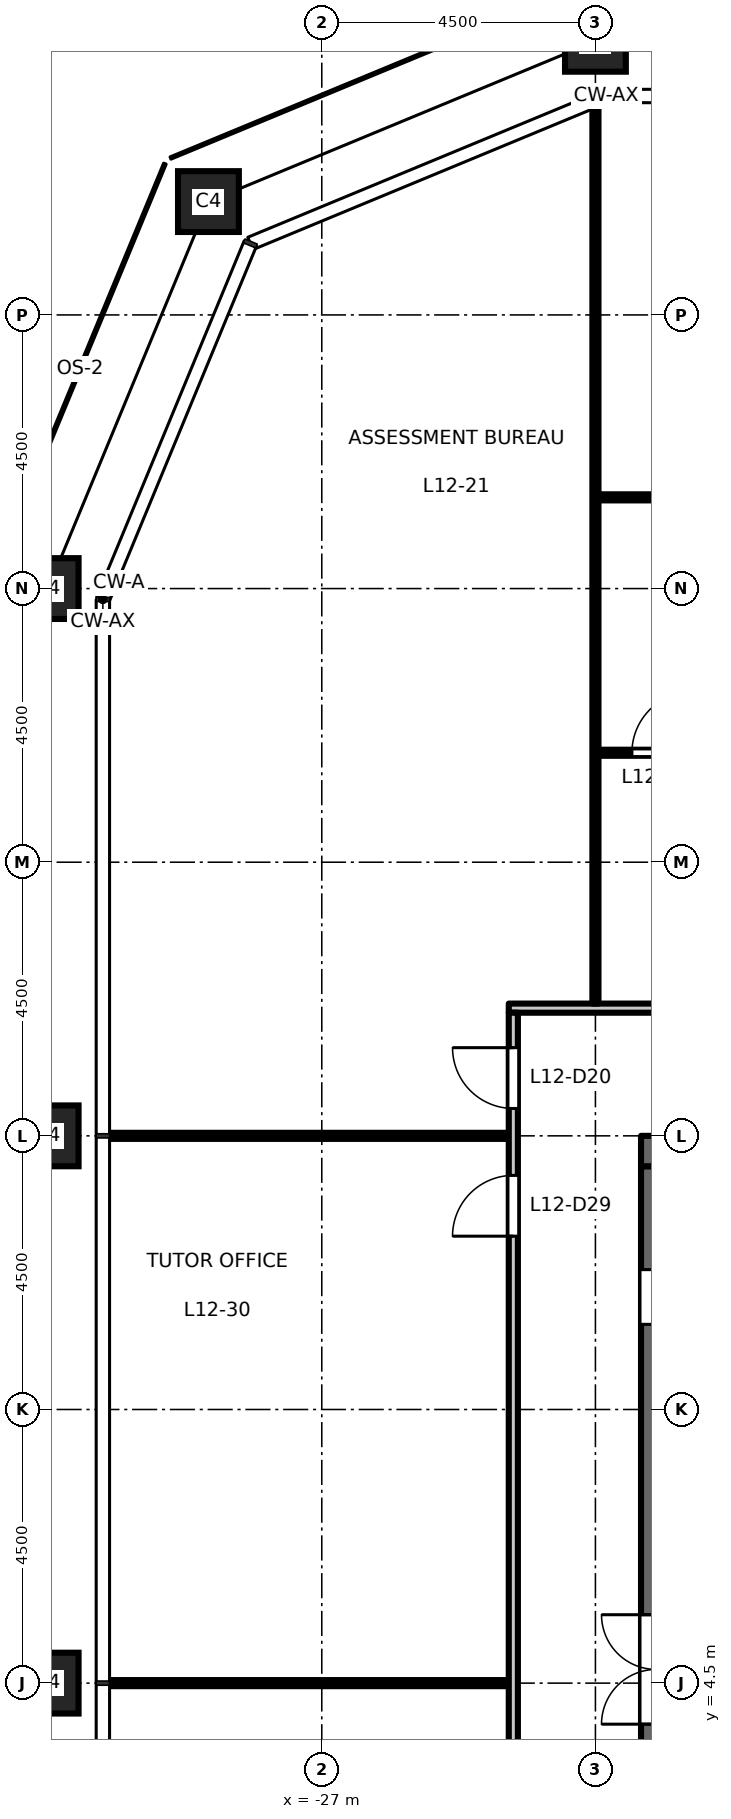
"""IFC4 building model, lengths in metres.
Left out: names, types, materials, properties, quantities, classifications, styles, units other than length and angle.
Written with IfcOpenShell. Run it as: python <this file> out.ifc"""

import sys

from ifc_helpers import new_model, si_unit, direction, frame, frame_2d, origin, origin_2d, place, context, subcontext, project, spatial, rectangle, hollow_rectangle, extrude, element, fill, save


model = new_model("IFC4")
c1 = context("Model", 3, precision=1e-05, world=origin(), true_north=direction((0.0, 1.0)))
c2 = subcontext(c1, "Body", "Model", "MODEL_VIEW")
j1 = project(units=[si_unit("LENGTHUNIT", "METRE"), si_unit("PLANEANGLEUNIT", "RADIAN")], contexts=[c1])
p1 = place(None, origin())
s1 = spatial("IfcSite", under=j1, at=p1, CompositionType="ELEMENT")
p2 = place(p1, origin())
s2 = spatial("IfcBuilding", under=s1, at=p2, CompositionType="ELEMENT")
p3 = place(p2, frame((0.0, 0.0, 58.2)))
s3 = spatial("IfcBuildingStorey", under=s2, at=p3, CompositionType="ELEMENT", Elevation=58.2)
for number, where, z_axis, x_axis in (
    (1, (-22.5, 31.5, 0.0), (0.0, 0.0, 1.0), (1.0, 0.0, 0.0)),
    (2, (-28.864, 28.864, 0.0), (0.0, 0.0, 1.0), (1.0, 0.0, 0.0)),
    (3, (-31.5, 22.5, 0.0), (0.0, 0.0, 1.0), (1.0, 0.0, 0.0)),
    (4, (-31.5, 13.5, 0.0), (0.0, 0.0, 1.0), (1.0, 0.0, 0.0)),
    (5, (-31.5, 4.5, 0.0), (0.0, 0.0, 1.0), (1.0, 0.0, 0.0)),
):
    element("IfcColumn", number, at=place(p3, frame(where, z_axis=z_axis, x_axis=x_axis)), inside=s3, PredefinedType="COLUMN", context=c2, shape_type="SweptSolid", body=[
        extrude(hollow_rectangle(XDim=1.0, YDim=1.0, WallThickness=0.06, at=origin_2d()), origin(), (0.0, 0.0, 1.0), 4.5),
    ])
p4 = place(p3, frame((-21.5, -13.0, 0.0), z_axis=(0.0, 0.0, 1.0), x_axis=(0.0, 1.0, 0.0)))
e6 = element("IfcWall", 6, at=p4, inside=s3, PredefinedType="SHEAR", context=c2, shape_type="SweptSolid", body=[
    extrude(rectangle(XDim=26.0, YDim=0.5, at=frame_2d((13.0, 0.0))), origin(), (0.0, 0.0, 1.0), 4.35),
])
p5 = place(p4, frame((16.825, 0.0, 0.0)))
e7 = element("IfcOpeningElement", 7, at=p5, cuts=e6, PredefinedType="OPENING", context=c2, shape_type="SweptSolid", body=[
    extrude(rectangle(XDim=1.8, YDim=2.1, at=frame_2d((0.9, 1.05))), frame((0.0, 0.26, 0.0), z_axis=(0.0, -1.0, 0.0), x_axis=(1.0, 0.0, 0.0)), (0.0, 0.0, 1.0), 0.52),
])
p6 = place(p4, frame((7.375, 0.0, 0.0)))
e8 = element("IfcOpeningElement", 8, at=p6, cuts=e6, PredefinedType="OPENING", context=c2, shape_type="SweptSolid", body=[
    extrude(rectangle(XDim=1.8, YDim=2.1, at=frame_2d((0.9, 1.05))), frame((0.0, 0.26, 0.0), z_axis=(0.0, -1.0, 0.0), x_axis=(1.0, 0.0, 0.0)), (0.0, 0.0, 1.0), 0.52),
])
p7 = place(p4, frame((23.4, 0.0, 0.0)))
e9 = element("IfcOpeningElement", 9, at=p7, cuts=e6, PredefinedType="OPENING", context=c2, shape_type="SweptSolid", body=[
    extrude(rectangle(XDim=0.9, YDim=2.1, at=frame_2d((0.45, 1.05))), frame((0.0, 0.26, 0.0), z_axis=(0.0, -1.0, 0.0), x_axis=(1.0, 0.0, 0.0)), (0.0, 0.0, 1.0), 0.52),
])
p8 = place(p3, frame((-8.25, 13.25, 0.0), z_axis=(0.0, 0.0, 1.0), x_axis=(-1.0, 0.0, 0.0)))
e10 = element("IfcWall", 10, at=p8, inside=s3, PredefinedType="SHEAR", context=c2, shape_type="SweptSolid", body=[
    extrude(rectangle(XDim=13.5, YDim=0.5, at=frame_2d((6.75, 0.0))), origin(), (0.0, 0.0, 1.0), 4.35),
])
p9 = place(p3, frame((-30.51, 4.5, 0.0), z_axis=(0.0, 0.0, 1.0), x_axis=(1.0, 0.0, 0.0)))
e11 = element("IfcWall", 11, at=p9, inside=s3, PredefinedType="PARTITIONING", context=c2, shape_type="SweptSolid", body=[
    extrude(rectangle(XDim=6.585, YDim=0.1, at=frame_2d((3.292, 0.0))), origin(), (0.0, 0.0, 1.0), 4.35),
])
p10 = place(p3, frame((-30.51, 13.5, 0.0), z_axis=(0.0, 0.0, 1.0), x_axis=(1.0, 0.0, 0.0)))
e12 = element("IfcWall", 12, at=p10, inside=s3, PredefinedType="PARTITIONING", context=c2, shape_type="SweptSolid", body=[
    extrude(rectangle(XDim=6.585, YDim=0.1, at=frame_2d((3.292, 0.0))), origin(), (0.0, 0.0, 1.0), 3.35),
])
p11 = place(p3, frame((-23.925, 15.6, 0.0), z_axis=(0.0, 0.0, 1.0), x_axis=(1.0, 0.0, 0.0)))
e13 = element("IfcWall", 13, at=p11, inside=s3, PredefinedType="PARTITIONING", context=c2, shape_type="SweptSolid", body=[
    extrude(rectangle(XDim=47.85, YDim=0.15, at=frame_2d((23.925, 0.0))), origin(), (0.0, 0.0, 1.0), 4.35),
])
p12 = place(p11, frame((8.775, 0.0, 0.0)))
e14 = element("IfcOpeningElement", 14, at=p12, cuts=e13, PredefinedType="OPENING", context=c2, shape_type="SweptSolid", body=[
    extrude(rectangle(XDim=1.0, YDim=2.1, at=frame_2d((0.5, 1.05))), frame((0.0, 0.085, 0.0), z_axis=(0.0, -1.0, 0.0), x_axis=(1.0, 0.0, 0.0)), (0.0, 0.0, 1.0), 0.17),
])
p13 = place(p11, frame((11.025, 0.0, 0.0)))
e15 = element("IfcOpeningElement", 15, at=p13, cuts=e13, PredefinedType="OPENING", context=c2, shape_type="SweptSolid", body=[
    extrude(rectangle(XDim=1.0, YDim=2.1, at=frame_2d((0.5, 1.05))), frame((0.0, 0.085, 0.0), z_axis=(0.0, -1.0, 0.0), x_axis=(1.0, 0.0, 0.0)), (0.0, 0.0, 1.0), 0.17),
])
p14 = place(p11, frame((26.775, 0.0, 0.0)))
e16 = element("IfcOpeningElement", 16, at=p14, cuts=e13, PredefinedType="OPENING", context=c2, shape_type="SweptSolid", body=[
    extrude(rectangle(XDim=1.0, YDim=2.1, at=frame_2d((0.5, 1.05))), frame((0.0, 0.085, 0.0), z_axis=(0.0, -1.0, 0.0), x_axis=(1.0, 0.0, 0.0)), (0.0, 0.0, 1.0), 0.17),
])
p15 = place(p11, frame((29.025, 0.0, 0.0)))
e17 = element("IfcOpeningElement", 17, at=p15, cuts=e13, PredefinedType="OPENING", context=c2, shape_type="SweptSolid", body=[
    extrude(rectangle(XDim=1.0, YDim=2.1, at=frame_2d((0.5, 1.05))), frame((0.0, 0.085, 0.0), z_axis=(0.0, -1.0, 0.0), x_axis=(1.0, 0.0, 0.0)), (0.0, 0.0, 1.0), 0.17),
])
p16 = place(p11, frame((38.025, 0.0, 0.0)))
e18 = element("IfcOpeningElement", 18, at=p16, cuts=e13, PredefinedType="OPENING", context=c2, shape_type="SweptSolid", body=[
    extrude(rectangle(XDim=1.0, YDim=2.1, at=frame_2d((0.5, 1.05))), frame((0.0, 0.085, 0.0), z_axis=(0.0, -1.0, 0.0), x_axis=(1.0, 0.0, 0.0)), (0.0, 0.0, 1.0), 0.17),
])
p17 = place(p3, frame((-22.45, 19.8, 0.0), z_axis=(0.0, 0.0, 1.0), x_axis=(1.0, 0.0, 0.0)))
e19 = element("IfcWall", 19, at=p17, inside=s3, PredefinedType="PARTITIONING", context=c2, shape_type="SweptSolid", body=[
    extrude(rectangle(XDim=8.9, YDim=0.1, at=frame_2d((4.45, 0.0))), origin(), (0.0, 0.0, 1.0), 4.35),
])
p18 = place(p17, frame((0.55, 0.0, 0.0)))
e20 = element("IfcOpeningElement", 20, at=p18, cuts=e19, PredefinedType="OPENING", context=c2, shape_type="SweptSolid", body=[
    extrude(rectangle(XDim=1.0, YDim=2.1, at=frame_2d((0.5, 1.05))), frame((0.0, 0.06, 0.0), z_axis=(0.0, -1.0, 0.0), x_axis=(1.0, 0.0, 0.0)), (0.0, 0.0, 1.0), 0.12),
])
p19 = place(p3, frame((-22.45, 24.0, 0.0), z_axis=(0.0, 0.0, 1.0), x_axis=(1.0, 0.0, 0.0)))
e21 = element("IfcWall", 21, at=p19, inside=s3, PredefinedType="PARTITIONING", context=c2, shape_type="SweptSolid", body=[
    extrude(rectangle(XDim=8.9, YDim=0.1, at=frame_2d((4.45, 0.0))), origin(), (0.0, 0.0, 1.0), 3.85),
])
p20 = place(p19, frame((7.3, 0.0, 0.0)))
e22 = element("IfcOpeningElement", 22, at=p20, cuts=e21, PredefinedType="OPENING", context=c2, shape_type="SweptSolid", body=[
    extrude(rectangle(XDim=1.0, YDim=2.1, at=frame_2d((0.5, 1.05))), frame((0.0, 0.06, 0.0), z_axis=(0.0, -1.0, 0.0), x_axis=(1.0, 0.0, 0.0)), (0.0, 0.0, 1.0), 0.12),
])
p21 = place(p3, frame((-23.85, -15.525, 0.0), z_axis=(0.0, 0.0, 1.0), x_axis=(0.0, 1.0, 0.0)))
e23 = element("IfcWall", 23, at=p21, inside=s3, PredefinedType="PARTITIONING", context=c2, shape_type="SweptSolid", body=[
    extrude(rectangle(XDim=31.05, YDim=0.15, at=frame_2d((15.525, 0.0))), origin(), (0.0, 0.0, 1.0), 4.35),
])
p22 = place(p21, frame((29.475, 0.0, 0.0)))
e24 = element("IfcOpeningElement", 24, at=p22, cuts=e23, PredefinedType="OPENING", context=c2, shape_type="SweptSolid", body=[
    extrude(rectangle(XDim=1.0, YDim=2.1, at=frame_2d((0.5, 1.05))), frame((0.0, 0.085, 0.0), z_axis=(0.0, -1.0, 0.0), x_axis=(1.0, 0.0, 0.0)), (0.0, 0.0, 1.0), 0.17),
])
p23 = place(p21, frame((0.375, 0.0, 0.0)))
e25 = element("IfcOpeningElement", 25, at=p23, cuts=e23, PredefinedType="OPENING", context=c2, shape_type="SweptSolid", body=[
    extrude(rectangle(XDim=1.0, YDim=2.1, at=frame_2d((0.5, 1.05))), frame((0.0, 0.085, 0.0), z_axis=(0.0, -1.0, 0.0), x_axis=(1.0, 0.0, 0.0)), (0.0, 0.0, 1.0), 0.17),
])
p24 = place(p21, frame((9.375, 0.0, 0.0)))
e26 = element("IfcOpeningElement", 26, at=p24, cuts=e23, PredefinedType="OPENING", context=c2, shape_type="SweptSolid", body=[
    extrude(rectangle(XDim=1.0, YDim=2.1, at=frame_2d((0.5, 1.05))), frame((0.0, 0.085, 0.0), z_axis=(0.0, -1.0, 0.0), x_axis=(1.0, 0.0, 0.0)), (0.0, 0.0, 1.0), 0.17),
])
p25 = place(p21, frame((11.625, 0.0, 0.0)))
e27 = element("IfcOpeningElement", 27, at=p25, cuts=e23, PredefinedType="OPENING", context=c2, shape_type="SweptSolid", body=[
    extrude(rectangle(XDim=1.0, YDim=2.1, at=frame_2d((0.5, 1.05))), frame((0.0, 0.085, 0.0), z_axis=(0.0, -1.0, 0.0), x_axis=(1.0, 0.0, 0.0)), (0.0, 0.0, 1.0), 0.17),
])
p26 = place(p21, frame((27.375, 0.0, 0.0)))
e28 = element("IfcOpeningElement", 28, at=p26, cuts=e23, PredefinedType="OPENING", context=c2, shape_type="SweptSolid", body=[
    extrude(rectangle(XDim=1.0, YDim=2.1, at=frame_2d((0.5, 1.05))), frame((0.0, 0.085, 0.0), z_axis=(0.0, -1.0, 0.0), x_axis=(1.0, 0.0, 0.0)), (0.0, 0.0, 1.0), 0.17),
])
p27 = place(p3, frame((-22.5, 15.675, 0.0), z_axis=(0.0, 0.0, 1.0), x_axis=(0.0, 1.0, 0.0)))
e29 = element("IfcWall", 29, at=p27, inside=s3, PredefinedType="PARTITIONING", context=c2, shape_type="SweptSolid", body=[
    extrude(rectangle(XDim=14.753, YDim=0.1, at=frame_2d((7.376, 0.0))), origin(), (0.0, 0.0, 1.0), 3.35),
])
p28 = place(p18, origin())
e30 = element("IfcDoor", 30, at=p28, inside=s3, OperationType="SINGLE_SWING_RIGHT", PredefinedType="DOOR", context=c2, shape_type="SweptSolid", body=[
    extrude(rectangle(XDim=1.0, YDim=2.1, at=frame_2d((0.5, 1.05))), frame((0.0, 0.025, 0.0), z_axis=(0.0, -1.0, 0.0), x_axis=(1.0, 0.0, 0.0)), (0.0, 0.0, 1.0), 0.05),
])
fill(e20, e30)
p29 = place(p22, origin())
e31 = element("IfcDoor", 31, at=p29, inside=s3, OperationType="SINGLE_SWING_RIGHT", PredefinedType="DOOR", context=c2, shape_type="SweptSolid", body=[
    extrude(rectangle(XDim=1.0, YDim=2.1, at=frame_2d((0.5, 1.05))), frame((0.0, 0.025, 0.0), z_axis=(0.0, -1.0, 0.0), x_axis=(1.0, 0.0, 0.0)), (0.0, 0.0, 1.0), 0.05),
])
fill(e24, e31)
p30 = place(p26, origin())
e32 = element("IfcDoor", 32, at=p30, inside=s3, OperationType="SINGLE_SWING_LEFT", PredefinedType="DOOR", context=c2, shape_type="SweptSolid", body=[
    extrude(rectangle(XDim=1.0, YDim=2.1, at=frame_2d((0.5, 1.05))), frame((0.0, 0.025, 0.0), z_axis=(0.0, -1.0, 0.0), x_axis=(1.0, 0.0, 0.0)), (0.0, 0.0, 1.0), 0.05),
])
fill(e28, e32)
save(model, sys.argv[1])
